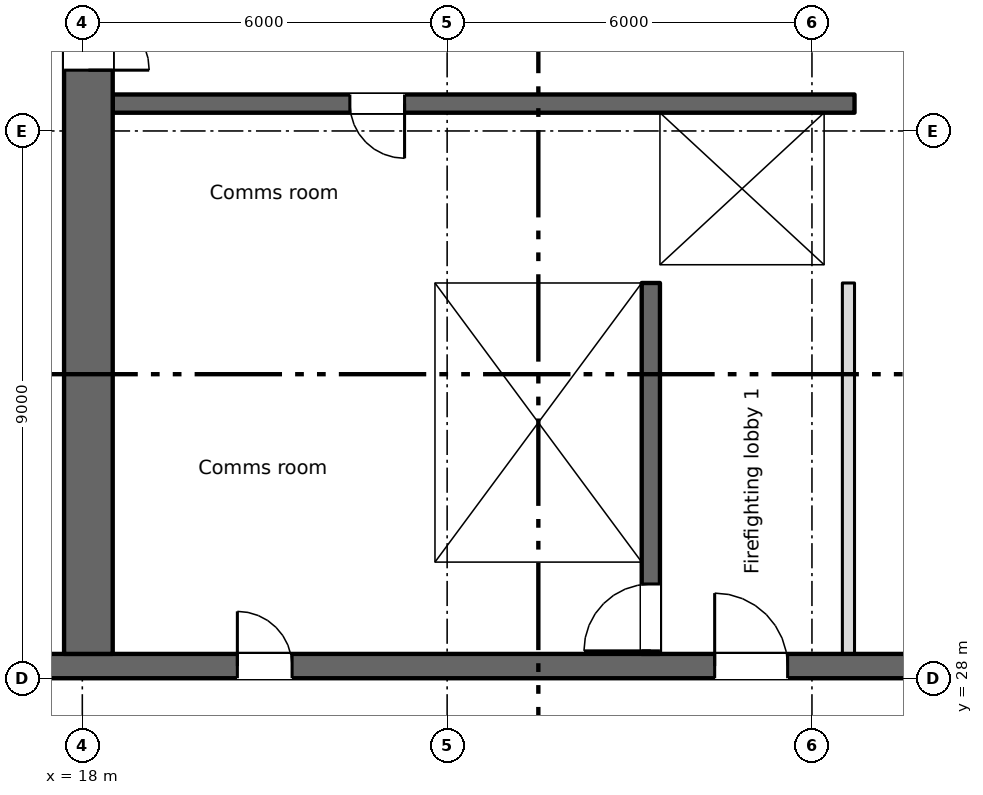
"""IFC4 building model, lengths in metres.
Left out: names, types, materials, properties, quantities, classifications, styles, units other than length and angle.
Written with IfcOpenShell. Run it as: python <this file> out.ifc"""

import sys

from ifc_helpers import new_model, si_unit, direction, frame, frame_2d, origin, place, context, subcontext, project, spatial, rectangle, extrude, element, fill, save


model = new_model("IFC4")
c1 = context("Model", 3, precision=1e-05, world=origin(), true_north=direction((0.0, 1.0)))
c2 = subcontext(c1, "Body", "Model", "MODEL_VIEW")
j1 = project(units=[si_unit("LENGTHUNIT", "METRE"), si_unit("PLANEANGLEUNIT", "RADIAN")], contexts=[c1])
p1 = place(None, origin())
s1 = spatial("IfcSite", under=j1, at=p1, CompositionType="ELEMENT")
p2 = place(p1, origin())
s2 = spatial("IfcBuilding", under=s1, at=p2, CompositionType="ELEMENT")
p3 = place(p2, frame((0.0, 0.0, 98.75)))
s3 = spatial("IfcBuildingStorey", under=s2, at=p3, CompositionType="ELEMENT", Elevation=98.75)
p4 = place(p3, frame((6.7, 28.2, 0.0), z_axis=(0.0, 0.0, 1.0), x_axis=(1.0, 0.0, 0.0)))
e1 = element("IfcWall", 1, at=p4, inside=s3, PredefinedType="SHEAR", context=c2, shape_type="SweptSolid", body=[
    extrude(rectangle(XDim=57.8, YDim=0.4, at=frame_2d((28.9, 0.0))), origin(), (0.0, 0.0, 1.0), 3.35),
])
p5 = place(p4, frame((13.85, 0.0, 0.0)))
e2 = element("IfcOpeningElement", 2, at=p5, cuts=e1, PredefinedType="OPENING", context=c2, shape_type="SweptSolid", body=[
    extrude(rectangle(XDim=0.9, YDim=2.1, at=frame_2d((0.45, 1.05))), frame((0.0, 0.21, 0.0), z_axis=(0.0, -1.0, 0.0), x_axis=(1.0, 0.0, 0.0)), (0.0, 0.0, 1.0), 0.42),
])
p6 = place(p4, frame((48.562, 0.0, 0.0)))
e3 = element("IfcOpeningElement", 3, at=p6, cuts=e1, PredefinedType="OPENING", context=c2, shape_type="SweptSolid", body=[
    extrude(rectangle(XDim=0.9, YDim=2.1, at=frame_2d((0.45, 1.05))), frame((0.0, 0.21, 0.0), z_axis=(0.0, -1.0, 0.0), x_axis=(1.0, 0.0, 0.0)), (0.0, 0.0, 1.0), 0.42),
])
p7 = place(p4, frame((51.137, 0.0, 0.0)))
e4 = element("IfcOpeningElement", 4, at=p7, cuts=e1, PredefinedType="OPENING", context=c2, shape_type="SweptSolid", body=[
    extrude(rectangle(XDim=0.9, YDim=2.1, at=frame_2d((0.45, 1.05))), frame((0.0, 0.21, 0.0), z_axis=(0.0, -1.0, 0.0), x_axis=(1.0, 0.0, 0.0)), (0.0, 0.0, 1.0), 0.42),
])
p8 = place(p4, frame((1.35, 0.0, 0.0)))
e5 = element("IfcOpeningElement", 5, at=p8, cuts=e1, PredefinedType="OPENING", context=c2, shape_type="SweptSolid", body=[
    extrude(rectangle(XDim=0.9, YDim=2.1, at=frame_2d((0.45, 1.05))), frame((0.0, 0.21, 0.0), z_axis=(0.0, -1.0, 0.0), x_axis=(1.0, 0.0, 0.0)), (0.0, 0.0, 1.0), 0.42),
])
p9 = place(p4, frame((4.7, 0.0, 0.0)))
e6 = element("IfcOpeningElement", 6, at=p9, cuts=e1, PredefinedType="OPENING", context=c2, shape_type="SweptSolid", body=[
    extrude(rectangle(XDim=1.2, YDim=2.1, at=frame_2d((0.6, 1.05))), frame((0.0, 0.21, 0.0), z_axis=(0.0, -1.0, 0.0), x_axis=(1.0, 0.0, 0.0)), (0.0, 0.0, 1.0), 0.42),
])
p10 = place(p4, frame((31.7, 0.0, 0.0)))
e7 = element("IfcOpeningElement", 7, at=p10, cuts=e1, PredefinedType="OPENING", context=c2, shape_type="SweptSolid", body=[
    extrude(rectangle(XDim=1.2, YDim=2.1, at=frame_2d((0.6, 1.05))), frame((0.0, 0.21, 0.0), z_axis=(0.0, -1.0, 0.0), x_axis=(1.0, 0.0, 0.0)), (0.0, 0.0, 1.0), 0.42),
])
p11 = place(p4, frame((55.2, 0.0, 0.0)))
e8 = element("IfcOpeningElement", 8, at=p11, cuts=e1, PredefinedType="OPENING", context=c2, shape_type="SweptSolid", body=[
    extrude(rectangle(XDim=1.2, YDim=2.1, at=frame_2d((0.6, 1.05))), frame((0.0, 0.21, 0.0), z_axis=(0.0, -1.0, 0.0), x_axis=(1.0, 0.0, 0.0)), (0.0, 0.0, 1.0), 0.42),
])
p12 = place(p4, frame((21.7, 0.0, 0.0)))
e9 = element("IfcOpeningElement", 9, at=p12, cuts=e1, PredefinedType="OPENING", context=c2, shape_type="SweptSolid", body=[
    extrude(rectangle(XDim=1.2, YDim=2.1, at=frame_2d((0.6, 1.05))), frame((0.0, 0.21, 0.0), z_axis=(0.0, -1.0, 0.0), x_axis=(1.0, 0.0, 0.0)), (0.0, 0.0, 1.0), 0.42),
])
p13 = place(p4, frame((41.7, 0.0, 0.0)))
e10 = element("IfcOpeningElement", 10, at=p13, cuts=e1, PredefinedType="OPENING", context=c2, shape_type="SweptSolid", body=[
    extrude(rectangle(XDim=1.2, YDim=2.1, at=frame_2d((0.6, 1.05))), frame((0.0, 0.21, 0.0), z_axis=(0.0, -1.0, 0.0), x_axis=(1.0, 0.0, 0.0)), (0.0, 0.0, 1.0), 0.42),
])
p14 = place(p4, frame((24.85, 0.0, 0.0)))
e11 = element("IfcOpeningElement", 11, at=p14, cuts=e1, PredefinedType="OPENING", context=c2, shape_type="SweptSolid", body=[
    extrude(rectangle(XDim=2.4, YDim=2.1, at=frame_2d((1.2, 1.05))), frame((0.0, 0.21, 0.0), z_axis=(0.0, -1.0, 0.0), x_axis=(1.0, 0.0, 0.0)), (0.0, 0.0, 1.0), 0.42),
])
p15 = place(p4, frame((37.35, 0.0, 0.0)))
e12 = element("IfcOpeningElement", 12, at=p15, cuts=e1, PredefinedType="OPENING", context=c2, shape_type="SweptSolid", body=[
    extrude(rectangle(XDim=2.4, YDim=2.1, at=frame_2d((1.2, 1.05))), frame((0.0, 0.21, 0.0), z_axis=(0.0, -1.0, 0.0), x_axis=(1.0, 0.0, 0.0)), (0.0, 0.0, 1.0), 0.42),
])
p16 = place(p4, frame((7.95, 0.0, 0.0)))
e13 = element("IfcOpeningElement", 13, at=p16, cuts=e1, PredefinedType="OPENING", context=c2, shape_type="SweptSolid", body=[
    extrude(rectangle(XDim=2.4, YDim=2.1, at=frame_2d((1.2, 1.05))), frame((0.0, 0.21, 0.0), z_axis=(0.0, -1.0, 0.0), x_axis=(1.0, 0.0, 0.0)), (0.0, 0.0, 1.0), 0.42),
])
p17 = place(p4, frame((28.85, 0.0, 0.0)))
e14 = element("IfcOpeningElement", 14, at=p17, cuts=e1, PredefinedType="OPENING", context=c2, shape_type="SweptSolid", body=[
    extrude(rectangle(XDim=0.9, YDim=2.1, at=frame_2d((0.45, 1.05))), frame((0.0, 0.21, 0.0), z_axis=(0.0, -1.0, 0.0), x_axis=(1.0, 0.0, 0.0)), (0.0, 0.0, 1.0), 0.42),
])
p18 = place(p4, frame((34.85, 0.0, 0.0)))
e15 = element("IfcOpeningElement", 15, at=p18, cuts=e1, PredefinedType="OPENING", context=c2, shape_type="SweptSolid", body=[
    extrude(rectangle(XDim=0.9, YDim=2.1, at=frame_2d((0.45, 1.05))), frame((0.0, 0.21, 0.0), z_axis=(0.0, -1.0, 0.0), x_axis=(1.0, 0.0, 0.0)), (0.0, 0.0, 1.0), 0.42),
])
p19 = place(p3, frame((18.1, 28.4, 0.0), z_axis=(0.0, 0.0, 1.0), x_axis=(0.0, 1.0, 0.0)))
e16 = element("IfcWall", 16, at=p19, inside=s3, PredefinedType="SHEAR", context=c2, shape_type="SweptSolid", body=[
    extrude(rectangle(XDim=16.8, YDim=0.8, at=frame_2d((8.4, 0.0))), origin(), (0.0, 0.0, 1.0), 3.35),
])
p20 = place(p19, frame((9.6, 0.0, 0.0)))
e17 = element("IfcOpeningElement", 17, at=p20, cuts=e16, PredefinedType="OPENING", context=c2, shape_type="SweptSolid", body=[
    extrude(rectangle(XDim=2.0, YDim=2.1, at=frame_2d((1.0, 1.05))), frame((0.0, 0.41, 0.0), z_axis=(0.0, -1.0, 0.0), x_axis=(1.0, 0.0, 0.0)), (0.0, 0.0, 1.0), 0.82),
])
p21 = place(p19, frame((15.35, 0.0, 0.0)))
e18 = element("IfcOpeningElement", 18, at=p21, cuts=e16, PredefinedType="OPENING", context=c2, shape_type="SweptSolid", body=[
    extrude(rectangle(XDim=1.2, YDim=2.1, at=frame_2d((0.6, 1.05))), frame((0.0, 0.41, 0.0), z_axis=(0.0, -1.0, 0.0), x_axis=(1.0, 0.0, 0.0)), (0.0, 0.0, 1.0), 0.82),
])
p22 = place(p3, frame((23.65, 28.4, 0.0), z_axis=(0.0, 0.0, 1.0), x_axis=(0.0, 1.0, 0.0)))
e19 = element("IfcWall", 19, at=p22, inside=s3, PredefinedType="SHEAR", context=c2, shape_type="SweptSolid", body=[
    extrude(rectangle(XDim=6.1, YDim=0.3, at=frame_2d((3.05, 0.0))), origin(), (0.0, 0.0, 1.0), 3.35),
])
p23 = place(p3, frame((27.35, 28.4, 0.0), z_axis=(0.0, 0.0, 1.0), x_axis=(0.0, 1.0, 0.0)))
e20 = element("IfcWall", 20, at=p23, inside=s3, PredefinedType="SHEAR", context=c2, shape_type="SweptSolid", body=[
    extrude(rectangle(XDim=6.1, YDim=0.3, at=frame_2d((3.05, 0.0))), origin(), (0.0, 0.0, 1.0), 3.35),
])
p24 = place(p23, frame((0.05, 0.0, 0.0)))
e21 = element("IfcOpeningElement", 21, at=p24, cuts=e20, PredefinedType="OPENING", context=c2, shape_type="SweptSolid", body=[
    extrude(rectangle(XDim=1.1, YDim=2.1, at=frame_2d((0.55, 1.05))), frame((0.0, 0.16, 0.0), z_axis=(0.0, -1.0, 0.0), x_axis=(1.0, 0.0, 0.0)), (0.0, 0.0, 1.0), 0.32),
])
p25 = place(p3, frame((18.5, 34.65, 0.0), z_axis=(0.0, 0.0, 1.0), x_axis=(1.0, 0.0, 0.0)))
e22 = element("IfcWall", 22, at=p25, inside=s3, PredefinedType="SHEAR", context=c2, shape_type="SweptSolid", body=[
    extrude(rectangle(XDim=12.2, YDim=0.3, at=frame_2d((6.1, 0.0))), origin(), (0.0, 0.0, 1.0), 3.35),
])
p26 = place(p25, frame((9.8, 0.0, 0.0)))
e23 = element("IfcOpeningElement", 23, at=p26, cuts=e22, PredefinedType="OPENING", context=c2, shape_type="SweptSolid", body=[
    extrude(rectangle(XDim=1.1, YDim=2.1, at=frame_2d((0.55, 1.05))), frame((0.0, 0.16, 0.0), z_axis=(0.0, -1.0, 0.0), x_axis=(1.0, 0.0, 0.0)), (0.0, 0.0, 1.0), 0.32),
])
p27 = place(p3, frame((30.7, 37.45, 0.0), z_axis=(0.0, 0.0, 1.0), x_axis=(-1.0, 0.0, 0.0)))
e24 = element("IfcWall", 24, at=p27, inside=s3, PredefinedType="SHEAR", context=c2, shape_type="SweptSolid", body=[
    extrude(rectangle(XDim=12.2, YDim=0.3, at=frame_2d((6.1, 0.0))), origin(), (0.0, 0.0, 1.0), 3.35),
])
p28 = place(p27, frame((7.4, 0.0, 0.0)))
e25 = element("IfcOpeningElement", 25, at=p28, cuts=e24, PredefinedType="OPENING", context=c2, shape_type="SweptSolid", body=[
    extrude(rectangle(XDim=0.9, YDim=2.1, at=frame_2d((0.45, 1.05))), frame((0.0, 0.16, 0.0), z_axis=(0.0, -1.0, 0.0), x_axis=(1.0, 0.0, 0.0)), (0.0, 0.0, 1.0), 0.32),
])
p29 = place(p3, frame((27.35, 34.8, 0.0), z_axis=(0.0, 0.0, 1.0), x_axis=(0.0, 1.0, 0.0)))
e26 = element("IfcWall", 26, at=p29, inside=s3, PredefinedType="SHEAR", context=c2, shape_type="SweptSolid", body=[
    extrude(rectangle(XDim=2.5, YDim=0.3, at=frame_2d((1.25, 0.0))), origin(), (0.0, 0.0, 1.0), 3.35),
])
p30 = place(p3, frame((30.45, 34.8, 0.0), z_axis=(0.0, 0.0, 1.0), x_axis=(0.0, 1.0, 0.0)))
e27 = element("IfcWall", 27, at=p30, inside=s3, PredefinedType="SHEAR", context=c2, shape_type="SweptSolid", body=[
    extrude(rectangle(XDim=2.5, YDim=0.5, at=frame_2d((1.25, 0.0))), origin(), (0.0, 0.0, 1.0), 3.35),
])
p31 = place(p3, frame((30.6, 28.4, 0.0), z_axis=(0.0, 0.0, 1.0), x_axis=(0.0, 1.0, 0.0)))
e28 = element("IfcWall", 28, at=p31, inside=s3, PredefinedType="PARTITIONING", context=c2, shape_type="SweptSolid", body=[
    extrude(rectangle(XDim=6.1, YDim=0.2, at=frame_2d((3.05, 0.0))), origin(), (0.0, 0.0, 1.0), 3.35),
])
p32 = place(p5, origin())
e29 = element("IfcDoor", 29, at=p32, inside=s3, OperationType="SINGLE_SWING_LEFT", PredefinedType="DOOR", context=c2, shape_type="SweptSolid", body=[
    extrude(rectangle(XDim=0.9, YDim=2.1, at=frame_2d((0.45, 1.05))), frame((0.0, 0.025, 0.0), z_axis=(0.0, -1.0, 0.0), x_axis=(1.0, 0.0, 0.0)), (0.0, 0.0, 1.0), 0.05),
])
fill(e2, e29)
p33 = place(p28, origin())
e30 = element("IfcDoor", 30, at=p33, inside=s3, OperationType="SINGLE_SWING_LEFT", PredefinedType="DOOR", context=c2, shape_type="SweptSolid", body=[
    extrude(rectangle(XDim=0.9, YDim=2.1, at=frame_2d((0.45, 1.05))), frame((0.0, 0.025, 0.0), z_axis=(0.0, -1.0, 0.0), x_axis=(1.0, 0.0, 0.0)), (0.0, 0.0, 1.0), 0.05),
])
fill(e25, e30)
p34 = place(p26, origin())
e31 = element("IfcDoor", 31, at=p34, inside=s3, OperationType="SLIDING_TO_LEFT", PredefinedType="DOOR", context=c2, shape_type="SweptSolid", body=[
    extrude(rectangle(XDim=1.1, YDim=2.1, at=frame_2d((0.55, 1.05))), frame((0.0, 0.025, 0.0), z_axis=(0.0, -1.0, 0.0), x_axis=(1.0, 0.0, 0.0)), (0.0, 0.0, 1.0), 0.05),
])
fill(e23, e31)
p35 = place(p24, origin())
e32 = element("IfcDoor", 32, at=p35, inside=s3, OperationType="SINGLE_SWING_LEFT", PredefinedType="DOOR", context=c2, shape_type="SweptSolid", body=[
    extrude(rectangle(XDim=1.1, YDim=2.1, at=frame_2d((0.55, 1.05))), frame((0.0, 0.025, 0.0), z_axis=(0.0, -1.0, 0.0), x_axis=(1.0, 0.0, 0.0)), (0.0, 0.0, 1.0), 0.05),
])
fill(e21, e32)
p36 = place(p12, origin())
e33 = element("IfcDoor", 33, at=p36, inside=s3, OperationType="SINGLE_SWING_LEFT", PredefinedType="DOOR", context=c2, shape_type="SweptSolid", body=[
    extrude(rectangle(XDim=1.2, YDim=2.1, at=frame_2d((0.6, 1.05))), frame((0.0, 0.025, 0.0), z_axis=(0.0, -1.0, 0.0), x_axis=(1.0, 0.0, 0.0)), (0.0, 0.0, 1.0), 0.05),
])
fill(e9, e33)
p37 = place(p20, origin())
e34 = element("IfcDoor", 34, at=p37, inside=s3, OperationType="DOUBLE_DOOR_SINGLE_SWING", PredefinedType="DOOR", context=c2, shape_type="SweptSolid", body=[
    extrude(rectangle(XDim=2.0, YDim=2.1, at=frame_2d((1.0, 1.05))), frame((0.0, 0.025, 0.0), z_axis=(0.0, -1.0, 0.0), x_axis=(1.0, 0.0, 0.0)), (0.0, 0.0, 1.0), 0.05),
])
fill(e17, e34)
save(model, sys.argv[1])
